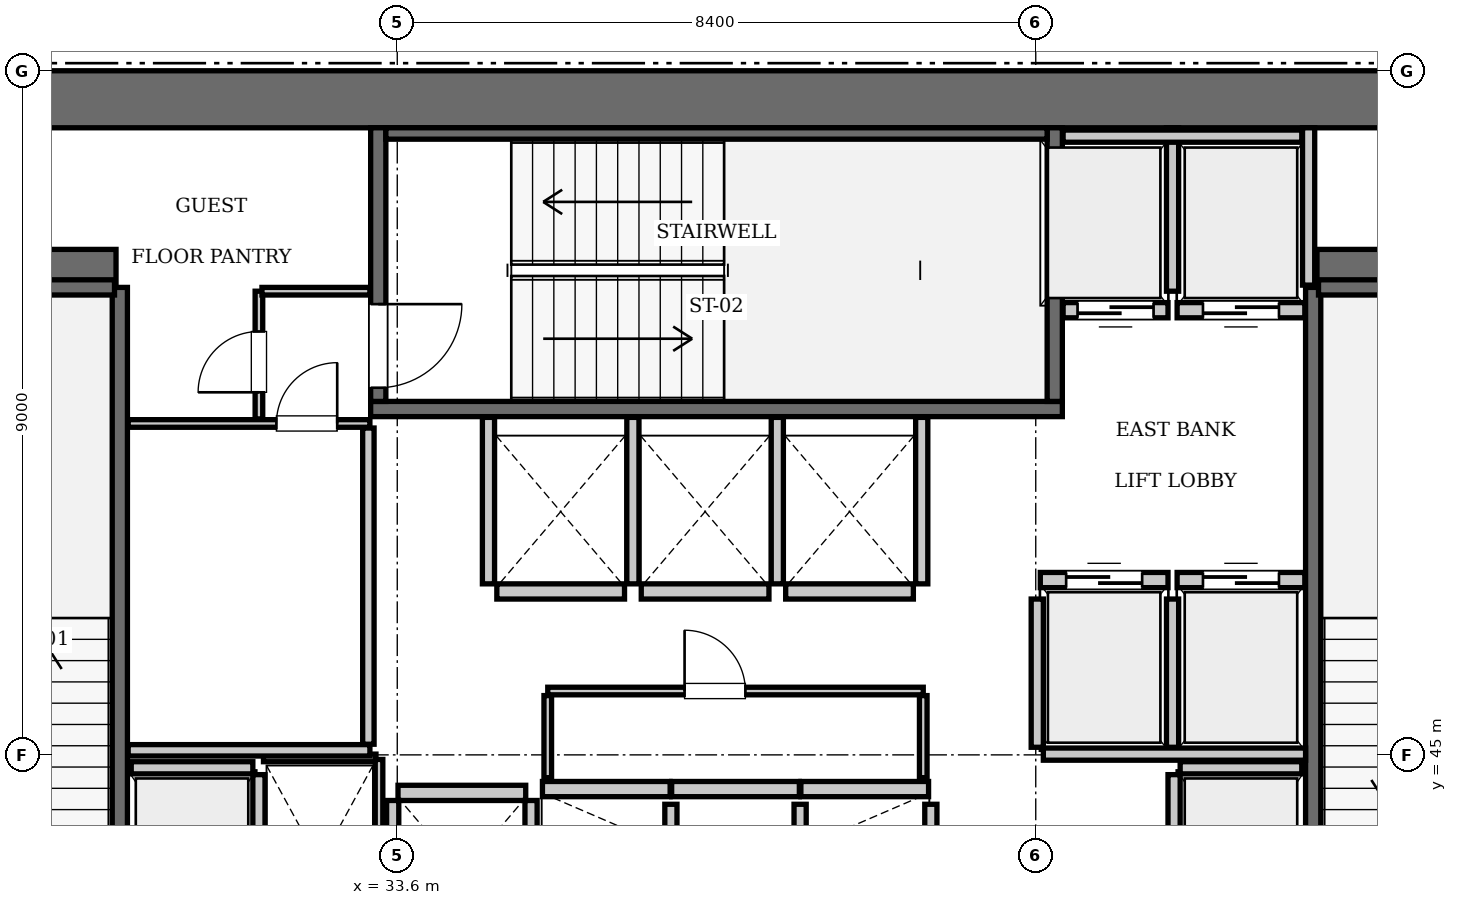
"""IFC4 building model, lengths in metres.
Left out: names, types, materials, properties, quantities, classifications, styles, units other than length and angle.
Written with IfcOpenShell. Run it as: python <this file> out.ifc"""

import sys

from ifc_helpers import new_model, si_unit, direction, frame, frame_2d, origin, place, context, subcontext, project, spatial, rectangle, extrude, element, fill, save


model = new_model("IFC4")
c1 = context("Model", 3, precision=1e-05, world=origin(), true_north=direction((0.0, 1.0)))
c2 = subcontext(c1, "Body", "Model", "MODEL_VIEW")
j1 = project(units=[si_unit("LENGTHUNIT", "METRE"), si_unit("PLANEANGLEUNIT", "RADIAN")], contexts=[c1])
p1 = place(None, origin())
s1 = spatial("IfcSite", under=j1, at=p1, CompositionType="ELEMENT")
p2 = place(p1, origin())
s2 = spatial("IfcBuilding", under=s1, at=p2, CompositionType="ELEMENT")
p3 = place(p2, frame((0.0, 0.0, 208.25)))
s3 = spatial("IfcBuildingStorey", under=s2, at=p3, CompositionType="ELEMENT", Elevation=208.25)
p4 = place(p3, frame((25.2, 53.625, 0.0), z_axis=(0.0, 0.0, 1.0), x_axis=(1.0, 0.0, 0.0)))
e1 = element("IfcWall", 1, at=p4, inside=s3, PredefinedType="SHEAR", context=c2, shape_type="SweptSolid", body=[
    extrude(rectangle(XDim=25.2, YDim=0.75, at=frame_2d((12.6, 0.0))), origin(), (0.0, 0.0, 1.0), 3.85),
])
for number, where, z_axis, x_axis in (
    (2, (25.95, 51.4, 0.0), (0.0, 0.0, 1.0), (1.0, 0.0, 0.0)),
    (3, (45.7, 51.4, 0.0), (0.0, 0.0, 1.0), (1.0, 0.0, 0.0)),
):
    element("IfcWall", number, at=place(p3, frame(where, z_axis=z_axis, x_axis=x_axis)), inside=s3, PredefinedType="SHEAR", context=c2, shape_type="SweptSolid", body=[
        extrude(rectangle(XDim=3.95, YDim=0.5, at=frame_2d((1.975, 0.0))), origin(), (0.0, 0.0, 1.0), 3.85),
    ])
p5 = place(p3, frame((29.95, 42.15, 0.0), z_axis=(0.0, 0.0, 1.0), x_axis=(0.0, 1.0, 0.0)))
e4 = element("IfcWall", 4, at=p5, inside=s3, PredefinedType="SOLIDWALL", context=c2, shape_type="SweptSolid", body=[
    extrude(rectangle(XDim=9.0, YDim=0.2, at=frame_2d((4.5, 0.0))), origin(), (0.0, 0.0, 1.0), 3.61),
])
p6 = place(p3, frame((26.38, 51.15, 0.0), z_axis=(0.0, 0.0, 1.0), x_axis=(1.0, 0.0, 0.0)))
e5 = element("IfcWall", 5, at=p6, inside=s3, PredefinedType="SOLIDWALL", context=c2, shape_type="SweptSolid", body=[
    extrude(rectangle(XDim=3.5, YDim=0.2, at=frame_2d((1.75, 0.0))), origin(), (0.0, 0.0, 1.0), 3.61),
])
p7 = place(p3, frame((33.25, 49.55, 0.0), z_axis=(0.0, 0.0, 1.0), x_axis=(1.0, 0.0, 0.0)))
e6 = element("IfcWall", 6, at=p7, inside=s3, PredefinedType="SOLIDWALL", context=c2, shape_type="SweptSolid", body=[
    extrude(rectangle(XDim=9.1, YDim=0.2, at=frame_2d((4.55, 0.0))), origin(), (0.0, 0.0, 1.0), 3.61),
])
p8 = place(p3, frame((42.25, 49.65, 0.0), z_axis=(0.0, 0.0, 1.0), x_axis=(0.0, 1.0, 0.0)))
e7 = element("IfcWall", 7, at=p8, inside=s3, PredefinedType="SOLIDWALL", context=c2, shape_type="SweptSolid", body=[
    extrude(rectangle(XDim=3.6, YDim=0.2, at=frame_2d((1.8, 0.0))), origin(), (0.0, 0.0, 1.0), 3.61),
])
p9 = place(p3, frame((33.35, 49.65, 0.0), z_axis=(0.0, 0.0, 1.0), x_axis=(0.0, 1.0, 0.0)))
e8 = element("IfcWall", 8, at=p9, inside=s3, PredefinedType="SOLIDWALL", context=c2, shape_type="SweptSolid", body=[
    extrude(rectangle(XDim=3.6, YDim=0.2, at=frame_2d((1.8, 0.0))), origin(), (0.0, 0.0, 1.0), 3.61),
])
p10 = place(p9, frame((0.18, 0.0, 0.0)))
e9 = element("IfcOpeningElement", 9, at=p10, cuts=e8, PredefinedType="OPENING", context=c2, shape_type="SweptSolid", body=[
    extrude(rectangle(XDim=1.1, YDim=2.15, at=frame_2d((0.55, 1.075))), frame((0.0, 0.11, 0.0), z_axis=(0.0, -1.0, 0.0), x_axis=(1.0, 0.0, 0.0)), (0.0, 0.0, 1.0), 0.22),
])
p11 = place(p3, frame((33.45, 53.175, 0.0), z_axis=(0.0, 0.0, 1.0), x_axis=(1.0, 0.0, 0.0)))
e10 = element("IfcWall", 10, at=p11, inside=s3, PredefinedType="SOLIDWALL", context=c2, shape_type="SweptSolid", body=[
    extrude(rectangle(XDim=8.7, YDim=0.15, at=frame_2d((4.35, 0.0))), origin(), (0.0, 0.0, 1.0), 3.61),
])
p12 = place(p3, frame((45.65, 42.15, 0.0), z_axis=(0.0, 0.0, 1.0), x_axis=(0.0, 1.0, 0.0)))
e11 = element("IfcWall", 11, at=p12, inside=s3, PredefinedType="SOLIDWALL", context=c2, shape_type="SweptSolid", body=[
    extrude(rectangle(XDim=9.0, YDim=0.2, at=frame_2d((4.5, 0.0))), origin(), (0.0, 0.0, 1.0), 3.61),
])
p13 = place(p3, frame((45.72, 51.15, 0.0), z_axis=(0.0, 0.0, 1.0), x_axis=(1.0, 0.0, 0.0)))
e12 = element("IfcWall", 12, at=p13, inside=s3, PredefinedType="SOLIDWALL", context=c2, shape_type="SweptSolid", body=[
    extrude(rectangle(XDim=3.5, YDim=0.2, at=frame_2d((1.75, 0.0))), origin(), (0.0, 0.0, 1.0), 3.61),
])
p14 = place(p3, frame((42.06, 47.3, 0.0), z_axis=(0.0, 0.0, 1.0), x_axis=(1.0, 0.0, 0.0)))
e13 = element("IfcWall", 13, at=p14, inside=s3, PredefinedType="SOLIDWALL", context=c2, shape_type="SweptSolid", body=[
    extrude(rectangle(XDim=1.68, YDim=0.2, at=frame_2d((0.84, 0.0))), origin(), (0.0, 0.0, 1.0), 3.61),
])
p15 = place(p14, frame((0.34, 0.0, 0.0)))
e14 = element("IfcOpeningElement", 14, at=p15, cuts=e13, PredefinedType="OPENING", context=c2, shape_type="SweptSolid", body=[
    extrude(rectangle(XDim=1.0, YDim=2.15, at=frame_2d((0.5, 1.075))), frame((0.0, 0.11, 0.0), z_axis=(0.0, -1.0, 0.0), x_axis=(1.0, 0.0, 0.0)), (0.0, 0.0, 1.0), 0.22),
])
p16 = place(p3, frame((43.86, 47.3, 0.0), z_axis=(0.0, 0.0, 1.0), x_axis=(1.0, 0.0, 0.0)))
e15 = element("IfcWall", 15, at=p16, inside=s3, PredefinedType="SOLIDWALL", context=c2, shape_type="SweptSolid", body=[
    extrude(rectangle(XDim=1.68, YDim=0.2, at=frame_2d((0.84, 0.0))), origin(), (0.0, 0.0, 1.0), 3.61),
])
p17 = place(p16, frame((0.34, 0.0, 0.0)))
e16 = element("IfcOpeningElement", 16, at=p17, cuts=e15, PredefinedType="OPENING", context=c2, shape_type="SweptSolid", body=[
    extrude(rectangle(XDim=1.0, YDim=2.15, at=frame_2d((0.5, 1.075))), frame((0.0, 0.11, 0.0), z_axis=(0.0, -1.0, 0.0), x_axis=(1.0, 0.0, 0.0)), (0.0, 0.0, 1.0), 0.22),
])
p18 = place(p3, frame((42.36, 50.85, 0.0), z_axis=(0.0, 0.0, 1.0), x_axis=(1.0, 0.0, 0.0)))
e17 = element("IfcWall", 17, at=p18, inside=s3, PredefinedType="SOLIDWALL", context=c2, shape_type="SweptSolid", body=[
    extrude(rectangle(XDim=1.38, YDim=0.2, at=frame_2d((0.69, 0.0))), origin(), (0.0, 0.0, 1.0), 3.61),
])
p19 = place(p18, frame((0.19, 0.0, 0.0)))
e18 = element("IfcOpeningElement", 18, at=p19, cuts=e17, PredefinedType="OPENING", context=c2, shape_type="SweptSolid", body=[
    extrude(rectangle(XDim=1.0, YDim=2.15, at=frame_2d((0.5, 1.075))), frame((0.0, 0.11, 0.0), z_axis=(0.0, -1.0, 0.0), x_axis=(1.0, 0.0, 0.0)), (0.0, 0.0, 1.0), 0.22),
])
p20 = place(p3, frame((43.86, 50.85, 0.0), z_axis=(0.0, 0.0, 1.0), x_axis=(1.0, 0.0, 0.0)))
e19 = element("IfcWall", 19, at=p20, inside=s3, PredefinedType="SOLIDWALL", context=c2, shape_type="SweptSolid", body=[
    extrude(rectangle(XDim=1.68, YDim=0.2, at=frame_2d((0.84, 0.0))), origin(), (0.0, 0.0, 1.0), 3.61),
])
p21 = place(p20, frame((0.34, 0.0, 0.0)))
e20 = element("IfcOpeningElement", 20, at=p21, cuts=e19, PredefinedType="OPENING", context=c2, shape_type="SweptSolid", body=[
    extrude(rectangle(XDim=1.0, YDim=2.15, at=frame_2d((0.5, 1.075))), frame((0.0, 0.11, 0.0), z_axis=(0.0, -1.0, 0.0), x_axis=(1.0, 0.0, 0.0)), (0.0, 0.0, 1.0), 0.22),
])
for number, where, z_axis, x_axis in (
    (21, (35.51, 44.55, 0.0), (0.0, 0.0, 1.0), (1.0, 0.0, 0.0)),
    (22, (37.21, 44.55, 0.0), (0.0, 0.0, 1.0), (1.0, 0.0, 0.0)),
):
    element("IfcWall", number, at=place(p3, frame(where, z_axis=z_axis, x_axis=x_axis)), inside=s3, PredefinedType="SOLIDWALL", context=c2, shape_type="SweptSolid", body=[
        extrude(rectangle(XDim=1.68, YDim=0.2, at=frame_2d((0.84, 0.0))), origin(), (0.0, 0.0, 1.0), 3.61),
    ])
for number, where, z_axis, x_axis in (
    (23, (38.91, 44.55, 0.0), (0.0, 0.0, 1.0), (1.0, 0.0, 0.0)),
    (24, (34.91, 47.15, 0.0), (0.0, 0.0, 1.0), (1.0, 0.0, 0.0)),
):
    element("IfcWall", number, at=place(p3, frame(where, z_axis=z_axis, x_axis=x_axis)), inside=s3, PredefinedType="SOLIDWALL", context=c2, shape_type="SweptSolid", body=[
        extrude(rectangle(XDim=1.68, YDim=0.2, at=frame_2d((0.84, 0.0))), origin(), (0.0, 0.0, 1.0), 3.61),
    ])
for number, where, z_axis, x_axis in (
    (25, (36.81, 47.15, 0.0), (0.0, 0.0, 1.0), (1.0, 0.0, 0.0)),
    (26, (38.71, 47.15, 0.0), (0.0, 0.0, 1.0), (1.0, 0.0, 0.0)),
    (27, (33.61, 44.5, 0.0), (0.0, 0.0, 1.0), (1.0, 0.0, 0.0)),
):
    element("IfcWall", number, at=place(p3, frame(where, z_axis=z_axis, x_axis=x_axis)), inside=s3, PredefinedType="SOLIDWALL", context=c2, shape_type="SweptSolid", body=[
        extrude(rectangle(XDim=1.68, YDim=0.2, at=frame_2d((0.84, 0.0))), origin(), (0.0, 0.0, 1.0), 3.61),
    ])
p22 = place(p3, frame((30.1, 44.83, 0.0), z_axis=(0.0, 0.0, 1.0), x_axis=(1.0, 0.0, 0.0)))
e28 = element("IfcWall", 28, at=p22, inside=s3, PredefinedType="SOLIDWALL", context=c2, shape_type="SweptSolid", body=[
    extrude(rectangle(XDim=1.6, YDim=0.16, at=frame_2d((0.8, 0.0))), origin(), (0.0, 0.0, 1.0), 3.61),
])
p23 = place(p3, frame((31.78, 42.15, 0.0), z_axis=(0.0, 0.0, 1.0), x_axis=(0.0, 1.0, 0.0)))
e29 = element("IfcWall", 29, at=p23, inside=s3, PredefinedType="SOLIDWALL", context=c2, shape_type="SweptSolid", body=[
    extrude(rectangle(XDim=2.59, YDim=0.16, at=frame_2d((1.295, 0.0))), origin(), (0.0, 0.0, 1.0), 3.61),
])
p24 = place(p3, frame((43.9, 44.83, 0.0), z_axis=(0.0, 0.0, 1.0), x_axis=(1.0, 0.0, 0.0)))
e30 = element("IfcWall", 30, at=p24, inside=s3, PredefinedType="SOLIDWALL", context=c2, shape_type="SweptSolid", body=[
    extrude(rectangle(XDim=1.6, YDim=0.16, at=frame_2d((0.8, 0.0))), origin(), (0.0, 0.0, 1.0), 3.61),
])
p25 = place(p3, frame((43.82, 42.15, 0.0), z_axis=(0.0, 0.0, 1.0), x_axis=(0.0, 1.0, 0.0)))
e31 = element("IfcWall", 31, at=p25, inside=s3, PredefinedType="SOLIDWALL", context=c2, shape_type="SweptSolid", body=[
    extrude(rectangle(XDim=2.59, YDim=0.16, at=frame_2d((1.295, 0.0))), origin(), (0.0, 0.0, 1.0), 3.61),
])
for number, where, z_axis, x_axis in (
    (32, (42.02, 45.1, 0.0), (0.0, 0.0, 1.0), (0.0, 1.0, 0.0)),
    (33, (43.8, 45.1, 0.0), (0.0, 0.0, 1.0), (0.0, 1.0, 0.0)),
):
    element("IfcWall", number, at=place(p3, frame(where, z_axis=z_axis, x_axis=x_axis)), inside=s3, PredefinedType="SOLIDWALL", context=c2, shape_type="SweptSolid", body=[
        extrude(rectangle(XDim=1.95, YDim=0.16, at=frame_2d((0.975, 0.0))), origin(), (0.0, 0.0, 1.0), 3.61),
    ])
p26 = place(p3, frame((42.1, 45.01, 0.0), z_axis=(0.0, 0.0, 1.0), x_axis=(1.0, 0.0, 0.0)))
e34 = element("IfcWall", 34, at=p26, inside=s3, PredefinedType="SOLIDWALL", context=c2, shape_type="SweptSolid", body=[
    extrude(rectangle(XDim=3.45, YDim=0.16, at=frame_2d((1.725, 0.0))), origin(), (0.0, 0.0, 1.0), 3.61),
])
p27 = place(p3, frame((45.59, 51.18, 0.0), z_axis=(0.0, 0.0, 1.0), x_axis=(0.0, 1.0, 0.0)))
e35 = element("IfcWall", 35, at=p27, inside=s3, PredefinedType="SOLIDWALL", context=c2, shape_type="SweptSolid", body=[
    extrude(rectangle(XDim=2.07, YDim=0.16, at=frame_2d((1.035, 0.0))), origin(), (0.0, 0.0, 1.0), 3.61),
])
p28 = place(p3, frame((43.8, 51.1, 0.0), z_axis=(0.0, 0.0, 1.0), x_axis=(0.0, 1.0, 0.0)))
e36 = element("IfcWall", 36, at=p28, inside=s3, PredefinedType="SOLIDWALL", context=c2, shape_type="SweptSolid", body=[
    extrude(rectangle(XDim=2.15, YDim=0.16, at=frame_2d((1.075, 0.0))), origin(), (0.0, 0.0, 1.0), 3.61),
])
p29 = place(p3, frame((42.36, 53.14, 0.0), z_axis=(0.0, 0.0, 1.0), x_axis=(1.0, 0.0, 0.0)))
e37 = element("IfcWall", 37, at=p29, inside=s3, PredefinedType="SOLIDWALL", context=c2, shape_type="SweptSolid", body=[
    extrude(rectangle(XDim=3.14, YDim=0.16, at=frame_2d((1.57, 0.0))), origin(), (0.0, 0.0, 1.0), 3.61),
])
for number, where, z_axis, x_axis in (
    (38, (37.2, 42.15, 0.0), (0.0, 0.0, 1.0), (0.0, 1.0, 0.0)),
    (39, (38.9, 42.15, 0.0), (0.0, 0.0, 1.0), (0.0, 1.0, 0.0)),
    (40, (40.62, 42.15, 0.0), (0.0, 0.0, 1.0), (0.0, 1.0, 0.0)),
):
    element("IfcWall", number, at=place(p3, frame(where, z_axis=z_axis, x_axis=x_axis)), inside=s3, PredefinedType="SOLIDWALL", context=c2, shape_type="SweptSolid", body=[
        extrude(rectangle(XDim=2.2, YDim=0.16, at=frame_2d((1.1, 0.0))), origin(), (0.0, 0.0, 1.0), 3.61),
    ])
for number, where, z_axis, x_axis in (
    (41, (34.8, 47.25, 0.0), (0.0, 0.0, 1.0), (0.0, 1.0, 0.0)),
    (42, (36.7, 47.25, 0.0), (0.0, 0.0, 1.0), (0.0, 1.0, 0.0)),
    (43, (38.6, 47.25, 0.0), (0.0, 0.0, 1.0), (0.0, 1.0, 0.0)),
    (44, (40.5, 47.25, 0.0), (0.0, 0.0, 1.0), (0.0, 1.0, 0.0)),
):
    element("IfcWall", number, at=place(p3, frame(where, z_axis=z_axis, x_axis=x_axis)), inside=s3, PredefinedType="SOLIDWALL", context=c2, shape_type="SweptSolid", body=[
        extrude(rectangle(XDim=2.19, YDim=0.16, at=frame_2d((1.095, 0.0))), origin(), (0.0, 0.0, 1.0), 3.61),
    ])
for number, where, z_axis, x_axis in (
    (45, (33.54, 42.15, 0.0), (0.0, 0.0, 1.0), (0.0, 1.0, 0.0)),
    (46, (35.36, 42.15, 0.0), (0.0, 0.0, 1.0), (0.0, 1.0, 0.0)),
):
    element("IfcWall", number, at=place(p3, frame(where, z_axis=z_axis, x_axis=x_axis)), inside=s3, PredefinedType="SOLIDWALL", context=c2, shape_type="SweptSolid", body=[
        extrude(rectangle(XDim=2.25, YDim=0.16, at=frame_2d((1.125, 0.0))), origin(), (0.0, 0.0, 1.0), 3.61),
    ])
p30 = place(p3, frame((31.84, 44.96, 0.0), z_axis=(0.0, 0.0, 1.0), x_axis=(1.0, 0.0, 0.0)))
e47 = element("IfcWall", 47, at=p30, inside=s3, PredefinedType="PARTITIONING", context=c2, shape_type="SweptSolid", body=[
    extrude(rectangle(XDim=1.48, YDim=0.1, at=frame_2d((0.74, 0.0))), origin(), (0.0, 0.0, 1.0), 3.61),
])
p31 = place(p3, frame((33.36, 42.21, 0.0), z_axis=(0.0, 0.0, 1.0), x_axis=(0.0, 1.0, 0.0)))
e48 = element("IfcWall", 48, at=p31, inside=s3, PredefinedType="PARTITIONING", context=c2, shape_type="SweptSolid", body=[
    extrude(rectangle(XDim=2.73, YDim=0.1, at=frame_2d((1.365, 0.0))), origin(), (0.0, 0.0, 1.0), 3.61),
])
p32 = place(p3, frame((35.58, 45.84, 0.0), z_axis=(0.0, 0.0, 1.0), x_axis=(1.0, 0.0, 0.0)))
e49 = element("IfcWall", 49, at=p32, inside=s3, PredefinedType="PARTITIONING", context=c2, shape_type="SweptSolid", body=[
    extrude(rectangle(XDim=4.94, YDim=0.1, at=frame_2d((2.47, 0.0))), origin(), (0.0, 0.0, 1.0), 3.61),
])
p33 = place(p32, frame((1.8, 0.0, 0.0)))
e50 = element("IfcOpeningElement", 50, at=p33, cuts=e49, PredefinedType="OPENING", context=c2, shape_type="SweptSolid", body=[
    extrude(rectangle(XDim=0.8, YDim=2.05, at=frame_2d((0.4, 1.025))), frame((0.0, 0.06, 0.0), z_axis=(0.0, -1.0, 0.0), x_axis=(1.0, 0.0, 0.0)), (0.0, 0.0, 1.0), 0.12),
])
for number, where, z_axis, x_axis in (
    (51, (35.58, 44.7, 0.0), (0.0, 0.0, 1.0), (0.0, 1.0, 0.0)),
    (52, (40.52, 44.7, 0.0), (0.0, 0.0, 1.0), (0.0, 1.0, 0.0)),
):
    element("IfcWall", number, at=place(p3, frame(where, z_axis=z_axis, x_axis=x_axis)), inside=s3, PredefinedType="PARTITIONING", context=c2, shape_type="SweptSolid", body=[
        extrude(rectangle(XDim=1.08, YDim=0.1, at=frame_2d((0.54, 0.0))), origin(), (0.0, 0.0, 1.0), 3.61),
    ])
p34 = place(p3, frame((30.06, 45.06, 0.0), z_axis=(0.0, 0.0, 1.0), x_axis=(1.0, 0.0, 0.0)))
e53 = element("IfcWall", 53, at=p34, inside=s3, PredefinedType="PARTITIONING", context=c2, shape_type="SweptSolid", body=[
    extrude(rectangle(XDim=3.18, YDim=0.15, at=frame_2d((1.59, 0.0))), origin(), (0.0, 0.0, 1.0), 3.61),
])
p35 = place(p3, frame((33.22, 45.14, 0.0), z_axis=(0.0, 0.0, 1.0), x_axis=(0.0, 1.0, 0.0)))
e54 = element("IfcWall", 54, at=p35, inside=s3, PredefinedType="PARTITIONING", context=c2, shape_type="SweptSolid", body=[
    extrude(rectangle(XDim=4.16, YDim=0.15, at=frame_2d((2.08, 0.0))), origin(), (0.0, 0.0, 1.0), 3.61),
])
p36 = place(p3, frame((30.06, 49.36, 0.0), z_axis=(0.0, 0.0, 1.0), x_axis=(1.0, 0.0, 0.0)))
e55 = element("IfcWall", 55, at=p36, inside=s3, PredefinedType="PARTITIONING", context=c2, shape_type="SweptSolid", body=[
    extrude(rectangle(XDim=3.18, YDim=0.1, at=frame_2d((1.59, 0.0))), origin(), (0.0, 0.0, 1.0), 3.61),
])
p37 = place(p36, frame((1.95, 0.0, 0.0)))
e56 = element("IfcOpeningElement", 56, at=p37, cuts=e55, PredefinedType="OPENING", context=c2, shape_type="SweptSolid", body=[
    extrude(rectangle(XDim=0.8, YDim=2.05, at=frame_2d((0.4, 1.025))), frame((0.0, 0.06, 0.0), z_axis=(0.0, -1.0, 0.0), x_axis=(1.0, 0.0, 0.0)), (0.0, 0.0, 1.0), 0.12),
])
p38 = place(p3, frame((31.78, 49.42, 0.0), z_axis=(0.0, 0.0, 1.0), x_axis=(0.0, 1.0, 0.0)))
e57 = element("IfcWall", 57, at=p38, inside=s3, PredefinedType="PARTITIONING", context=c2, shape_type="SweptSolid", body=[
    extrude(rectangle(XDim=1.68, YDim=0.1, at=frame_2d((0.84, 0.0))), origin(), (0.0, 0.0, 1.0), 3.61),
])
p39 = place(p38, frame((0.35, 0.0, 0.0)))
e58 = element("IfcOpeningElement", 58, at=p39, cuts=e57, PredefinedType="OPENING", context=c2, shape_type="SweptSolid", body=[
    extrude(rectangle(XDim=0.8, YDim=2.05, at=frame_2d((0.4, 1.025))), frame((0.0, 0.06, 0.0), z_axis=(0.0, -1.0, 0.0), x_axis=(1.0, 0.0, 0.0)), (0.0, 0.0, 1.0), 0.12),
])
p40 = place(p3, frame((31.82, 51.1, 0.0), z_axis=(0.0, 0.0, 1.0), x_axis=(1.0, 0.0, 0.0)))
e59 = element("IfcWall", 59, at=p40, inside=s3, PredefinedType="PARTITIONING", context=c2, shape_type="SweptSolid", body=[
    extrude(rectangle(XDim=1.42, YDim=0.1, at=frame_2d((0.71, 0.0))), origin(), (0.0, 0.0, 1.0), 3.61),
])
p41 = place(p10, frame((1.1, 0.0, 0.0), z_axis=(0.0, 0.0, 1.0), x_axis=(-1.0, 0.0, 0.0)))
e60 = element("IfcDoor", 60, at=p41, inside=s3, OperationType="SINGLE_SWING_LEFT", PredefinedType="DOOR", context=c2, shape_type="SweptSolid", body=[
    extrude(rectangle(XDim=1.1, YDim=2.15, at=frame_2d((0.55, 1.075))), frame((0.0, 0.025, 0.0), z_axis=(0.0, -1.0, 0.0), x_axis=(1.0, 0.0, 0.0)), (0.0, 0.0, 1.0), 0.05),
])
fill(e9, e60)
p42 = place(p15, origin())
e61 = element("IfcDoor", 61, at=p42, inside=s3, OperationType="SLIDING_TO_LEFT", PredefinedType="DOOR", context=c2, shape_type="SweptSolid", body=[
    extrude(rectangle(XDim=1.0, YDim=2.15, at=frame_2d((0.5, 1.075))), frame((0.0, 0.025, 0.0), z_axis=(0.0, -1.0, 0.0), x_axis=(1.0, 0.0, 0.0)), (0.0, 0.0, 1.0), 0.05),
])
fill(e14, e61)
p43 = place(p17, origin())
e62 = element("IfcDoor", 62, at=p43, inside=s3, OperationType="SLIDING_TO_LEFT", PredefinedType="DOOR", context=c2, shape_type="SweptSolid", body=[
    extrude(rectangle(XDim=1.0, YDim=2.15, at=frame_2d((0.5, 1.075))), frame((0.0, 0.025, 0.0), z_axis=(0.0, -1.0, 0.0), x_axis=(1.0, 0.0, 0.0)), (0.0, 0.0, 1.0), 0.05),
])
fill(e16, e62)
p44 = place(p19, frame((1.0, 0.0, 0.0), z_axis=(0.0, 0.0, 1.0), x_axis=(-1.0, 0.0, 0.0)))
e63 = element("IfcDoor", 63, at=p44, inside=s3, OperationType="SLIDING_TO_LEFT", PredefinedType="DOOR", context=c2, shape_type="SweptSolid", body=[
    extrude(rectangle(XDim=1.0, YDim=2.15, at=frame_2d((0.5, 1.075))), frame((0.0, 0.025, 0.0), z_axis=(0.0, -1.0, 0.0), x_axis=(1.0, 0.0, 0.0)), (0.0, 0.0, 1.0), 0.05),
])
fill(e18, e63)
p45 = place(p21, frame((1.0, 0.0, 0.0), z_axis=(0.0, 0.0, 1.0), x_axis=(-1.0, 0.0, 0.0)))
e64 = element("IfcDoor", 64, at=p45, inside=s3, OperationType="SLIDING_TO_LEFT", PredefinedType="DOOR", context=c2, shape_type="SweptSolid", body=[
    extrude(rectangle(XDim=1.0, YDim=2.15, at=frame_2d((0.5, 1.075))), frame((0.0, 0.025, 0.0), z_axis=(0.0, -1.0, 0.0), x_axis=(1.0, 0.0, 0.0)), (0.0, 0.0, 1.0), 0.05),
])
fill(e20, e64)
p46 = place(p33, origin())
e65 = element("IfcDoor", 65, at=p46, inside=s3, OperationType="SINGLE_SWING_LEFT", PredefinedType="DOOR", context=c2, shape_type="SweptSolid", body=[
    extrude(rectangle(XDim=0.8, YDim=2.05, at=frame_2d((0.4, 1.025))), frame((0.0, 0.025, 0.0), z_axis=(0.0, -1.0, 0.0), x_axis=(1.0, 0.0, 0.0)), (0.0, 0.0, 1.0), 0.05),
])
fill(e50, e65)
p47 = place(p37, origin())
e66 = element("IfcDoor", 66, at=p47, inside=s3, OperationType="SINGLE_SWING_RIGHT", PredefinedType="DOOR", context=c2, shape_type="SweptSolid", body=[
    extrude(rectangle(XDim=0.8, YDim=2.05, at=frame_2d((0.4, 1.025))), frame((0.0, 0.025, 0.0), z_axis=(0.0, -1.0, 0.0), x_axis=(1.0, 0.0, 0.0)), (0.0, 0.0, 1.0), 0.05),
])
fill(e56, e66)
p48 = place(p39, origin())
e67 = element("IfcDoor", 67, at=p48, inside=s3, OperationType="SINGLE_SWING_LEFT", PredefinedType="DOOR", context=c2, shape_type="SweptSolid", body=[
    extrude(rectangle(XDim=0.8, YDim=2.05, at=frame_2d((0.4, 1.025))), frame((0.0, 0.025, 0.0), z_axis=(0.0, -1.0, 0.0), x_axis=(1.0, 0.0, 0.0)), (0.0, 0.0, 1.0), 0.05),
])
fill(e58, e67)
save(model, sys.argv[1])
